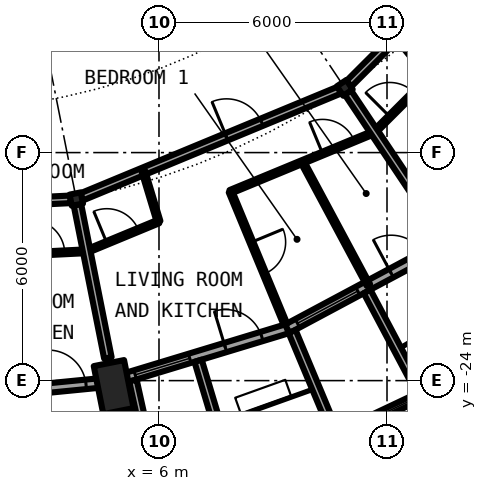
"""IFC4 building model, lengths in metres.
Left out: names, types, materials, properties, quantities, classifications, styles, units other than length and angle.
Written with IfcOpenShell. Run it as: python <this file> out.ifc"""

import sys

from ifc_helpers import new_model, si_unit, direction, frame, frame_2d, origin, origin_2d, place, context, subcontext, project, spatial, rectangle, circle, hollow_circle, i_section, extrude, element, fill, save


model = new_model("IFC4")
c1 = context("Model", 3, precision=1e-05, world=origin(), true_north=direction((0.0, 1.0)))
c2 = subcontext(c1, "Body", "Model", "MODEL_VIEW")
j1 = project(units=[si_unit("LENGTHUNIT", "METRE"), si_unit("PLANEANGLEUNIT", "RADIAN")], contexts=[c1])
p1 = place(None, origin())
s1 = spatial("IfcSite", under=j1, at=p1, CompositionType="ELEMENT")
p2 = place(p1, origin())
s2 = spatial("IfcBuilding", under=s1, at=p2, CompositionType="ELEMENT")
p3 = place(p2, frame((0.0, 0.0, 243.2)))
s3 = spatial("IfcBuildingStorey", under=s2, at=p3, CompositionType="ELEMENT", Elevation=243.2)
p4 = place(p3, frame((4.934, -24.803, 0.242), z_axis=(-0.081385783955, 0.409141348854, 0.908834259273), x_axis=(-0.980784129255, -0.195096109141, 0.0)))
e1 = element("IfcColumn", 1, at=p4, inside=s3, PredefinedType="COLUMN", context=c2, shape_type="SweptSolid", body=[
    extrude(hollow_circle(Radius=0.406, WallThickness=0.03, at=origin_2d()), origin(), (0.0, 0.0, 1.0), 3.09),
])
for number, where, z_axis, x_axis in (
    (2, (3.824, -19.223, 0.0), (0.0, 0.0, 1.0), (0.195, -0.981, 0.0)),
    (3, (10.889, -16.297, 0.0), (0.0, 0.0, 1.0), (0.556, -0.831, 0.0)),
):
    element("IfcColumn", number, at=place(p3, frame(where, z_axis=z_axis, x_axis=x_axis)), inside=s3, PredefinedType="COLUMN", context=c2, shape_type="SweptSolid", body=[
        extrude(i_section(OverallWidth=0.3, OverallDepth=0.3, WebThickness=0.011, FlangeThickness=0.019, FilletRadius=0.027, at=origin_2d()), origin(), (0.0, 0.0, 1.0), 3.05),
    ])
p5 = place(p3, frame((0.0, -24.5, 0.0), z_axis=(0.0, 0.0, 1.0), x_axis=(0.995181568754, 0.098049197923, 0.0)))
e4 = element("IfcWall", 4, at=p5, inside=s3, PredefinedType="SOLIDWALL", context=c2, shape_type="SweptSolid", body=[
    extrude(rectangle(XDim=4.803, YDim=0.25, at=frame_2d((2.402, 0.0))), origin(), (0.0, 0.0, 1.0), 2.7),
])
p6 = place(p5, frame((0.304, 0.0, 0.3)))
e5 = element("IfcOpeningElement", 5, at=p6, cuts=e4, PredefinedType="OPENING", context=c2, shape_type="SweptSolid", body=[
    extrude(rectangle(XDim=1.8, YDim=2.1, at=frame_2d((0.9, 1.05))), frame((0.0, 0.135, 0.0), z_axis=(0.0, -1.0, 0.0), x_axis=(1.0, 0.0, 0.0)), (0.0, 0.0, 1.0), 0.27),
])
p7 = place(p5, frame((3.099, 0.0, 0.0)))
e6 = element("IfcOpeningElement", 6, at=p7, cuts=e4, PredefinedType="OPENING", context=c2, shape_type="SweptSolid", body=[
    extrude(rectangle(XDim=1.0, YDim=2.2, at=frame_2d((0.5, 1.1))), frame((0.0, 0.135, 0.0), z_axis=(0.0, -1.0, 0.0), x_axis=(1.0, 0.0, 0.0)), (0.0, 0.0, 1.0), 0.27),
])
p8 = place(p3, frame((4.78, -24.029, 0.0), z_axis=(0.0, 0.0, 1.0), x_axis=(0.956947414517, 0.290261340605, 0.0)))
e7 = element("IfcWall", 7, at=p8, inside=s3, PredefinedType="SOLIDWALL", context=c2, shape_type="SweptSolid", body=[
    extrude(rectangle(XDim=4.803, YDim=0.25, at=frame_2d((2.401, 0.0))), origin(), (0.0, 0.0, 1.0), 2.7),
])
p9 = place(p8, frame((0.62, 0.0, 0.3)))
e8 = element("IfcOpeningElement", 8, at=p9, cuts=e7, PredefinedType="OPENING", context=c2, shape_type="SweptSolid", body=[
    extrude(rectangle(XDim=1.5, YDim=2.1, at=frame_2d((0.75, 1.05))), frame((0.0, 0.135, 0.0), z_axis=(0.0, -1.0, 0.0), x_axis=(1.0, 0.0, 0.0)), (0.0, 0.0, 1.0), 0.27),
])
p10 = place(p8, frame((3.099, 0.0, 0.0)))
e9 = element("IfcOpeningElement", 9, at=p10, cuts=e7, PredefinedType="OPENING", context=c2, shape_type="SweptSolid", body=[
    extrude(rectangle(XDim=1.0, YDim=2.2, at=frame_2d((0.5, 1.1))), frame((0.0, 0.135, 0.0), z_axis=(0.0, -1.0, 0.0), x_axis=(1.0, 0.0, 0.0)), (0.0, 0.0, 1.0), 0.27),
])
p11 = place(p3, frame((5.314, -23.998, -0.03), z_axis=(0.0, 0.0, 1.0), x_axis=(0.216443576636, -0.976295128603, 0.0)))
e10 = element("IfcWall", 10, at=p11, inside=s3, PredefinedType="SOLIDWALL", context=c2, shape_type="SweptSolid", body=[
    extrude(rectangle(XDim=2.92, YDim=0.2, at=frame_2d((1.46, 0.0))), origin(), (0.0, 0.0, 1.0), 2.73),
])
p12 = place(p3, frame((7.029, -23.477, -0.03), z_axis=(0.0, 0.0, 1.0), x_axis=(0.286681681931, -0.958025893828, 0.0)))
e11 = element("IfcWall", 11, at=p12, inside=s3, PredefinedType="SOLIDWALL", context=c2, shape_type="SweptSolid", body=[
    extrude(rectangle(XDim=2.992, YDim=0.2, at=frame_2d((1.496, 0.0))), origin(), (0.0, 0.0, 1.0), 2.73),
])
p13 = place(p3, frame((9.376, -22.635, 0.0), z_axis=(0.0, 0.0, 1.0), x_axis=(0.881903608701, 0.471429766731, 0.0)))
e12 = element("IfcWall", 12, at=p13, inside=s3, PredefinedType="SOLIDWALL", context=c2, shape_type="SweptSolid", body=[
    extrude(rectangle(XDim=4.802, YDim=0.25, at=frame_2d((2.401, 0.0))), origin(), (0.0, 0.0, 1.0), 2.7),
])
p14 = place(p13, frame((0.304, 0.0, 0.3)))
e13 = element("IfcOpeningElement", 13, at=p14, cuts=e12, PredefinedType="OPENING", context=c2, shape_type="SweptSolid", body=[
    extrude(rectangle(XDim=1.8, YDim=2.1, at=frame_2d((0.9, 1.05))), frame((0.0, 0.135, 0.0), z_axis=(0.0, -1.0, 0.0), x_axis=(1.0, 0.0, 0.0)), (0.0, 0.0, 1.0), 0.27),
])
p15 = place(p13, frame((3.099, 0.0, 0.0)))
e14 = element("IfcOpeningElement", 14, at=p15, cuts=e12, PredefinedType="OPENING", context=c2, shape_type="SweptSolid", body=[
    extrude(rectangle(XDim=1.0, YDim=2.2, at=frame_2d((0.5, 1.1))), frame((0.0, 0.135, 0.0), z_axis=(0.0, -1.0, 0.0), x_axis=(1.0, 0.0, 0.0)), (0.0, 0.0, 1.0), 0.27),
])
p16 = place(p3, frame((10.558, -25.501, -0.03), z_axis=(0.0, 0.0, 1.0), x_axis=(0.904004727627, 0.42752245839, 0.0)))
e15 = element("IfcWall", 15, at=p16, inside=s3, PredefinedType="SOLIDWALL", context=c2, shape_type="SweptSolid", body=[
    extrude(rectangle(XDim=2.718, YDim=0.2, at=frame_2d((1.359, 0.0))), origin(), (0.0, 0.0, 1.0), 2.73),
])
p17 = place(p16, frame((0.319, 0.0, 0.33)))
e16 = element("IfcOpeningElement", 16, at=p17, cuts=e15, PredefinedType="OPENING", context=c2, shape_type="SweptSolid", body=[
    extrude(circle(Radius=1.04, at=frame_2d((1.04, 1.04))), frame((0.0, 0.11, 0.0), z_axis=(0.0, -1.0, 0.0), x_axis=(1.0, 0.0, 0.0)), (0.0, 0.0, 1.0), 0.22),
])
p18 = place(p3, frame((9.503, -22.709, -0.03), z_axis=(0.0, 0.0, 1.0), x_axis=(0.386136412103, -0.922441689891, 0.0)))
e17 = element("IfcWall", 17, at=p18, inside=s3, PredefinedType="SOLIDWALL", context=c2, shape_type="SweptSolid", body=[
    extrude(rectangle(XDim=2.883, YDim=0.2, at=frame_2d((1.441, 0.0))), origin(), (0.0, 0.0, 1.0), 2.73),
])
p19 = place(p3, frame((11.475, -21.655, -0.03), z_axis=(0.0, 0.0, 1.0), x_axis=(0.467917715158, -0.883772036128, 0.0)))
e18 = element("IfcWall", 18, at=p19, inside=s3, PredefinedType="SOLIDWALL", context=c2, shape_type="SweptSolid", body=[
    extrude(rectangle(XDim=2.992, YDim=0.2, at=frame_2d((1.496, 0.0))), origin(), (0.0, 0.0, 1.0), 2.73),
])
p20 = place(p3, frame((2.045, -20.697, 0.0), z_axis=(0.0, 0.0, 1.0), x_axis=(0.998789106726, 0.049196750766, 0.0)))
e19 = element("IfcWall", 19, at=p20, inside=s3, PredefinedType="PARTITIONING", context=c2, shape_type="SweptSolid", body=[
    extrude(rectangle(XDim=2.054, YDim=0.1, at=frame_2d((1.027, 0.0))), origin(), (0.0, 0.0, 1.0), 2.7),
])
p21 = place(p20, frame((0.577, 0.0, 0.0)))
e20 = element("IfcOpeningElement", 20, at=p21, cuts=e19, PredefinedType="OPENING", context=c2, shape_type="SweptSolid", body=[
    extrude(rectangle(XDim=0.9, YDim=2.3, at=frame_2d((0.45, 1.15))), frame((0.0, 0.06, 0.0), z_axis=(0.0, -1.0, 0.0), x_axis=(1.0, 0.0, 0.0)), (0.0, 0.0, 1.0), 0.12),
])
p22 = place(p3, frame((4.097, -20.596, 0.0), z_axis=(0.0, 0.0, 1.0), x_axis=(0.924012474812, 0.382362323448, 0.0)))
e21 = element("IfcWall", 21, at=p22, inside=s3, PredefinedType="PARTITIONING", context=c2, shape_type="SweptSolid", body=[
    extrude(rectangle(XDim=2.048, YDim=0.1, at=frame_2d((1.024, 0.0))), origin(), (0.0, 0.0, 1.0), 2.7),
])
p23 = place(p22, frame((0.574, 0.0, 0.0)))
e22 = element("IfcOpeningElement", 22, at=p23, cuts=e21, PredefinedType="OPENING", context=c2, shape_type="SweptSolid", body=[
    extrude(rectangle(XDim=0.9, YDim=2.3, at=frame_2d((0.45, 1.15))), frame((0.0, 0.06, 0.0), z_axis=(0.0, -1.0, 0.0), x_axis=(1.0, 0.0, 0.0)), (0.0, 0.0, 1.0), 0.12),
])
p24 = place(p3, frame((7.874, -19.033, 0.0), z_axis=(0.0, 0.0, 1.0), x_axis=(0.924018283069, 0.382348286976, 0.0)))
e23 = element("IfcWall", 23, at=p24, inside=s3, PredefinedType="PARTITIONING", context=c2, shape_type="SweptSolid", body=[
    extrude(rectangle(XDim=4.101, YDim=0.1, at=frame_2d((2.05, 0.0))), origin(), (0.0, 0.0, 1.0), 2.7),
])
p25 = place(p24, frame((2.632, 0.0, 0.0)))
e24 = element("IfcOpeningElement", 24, at=p25, cuts=e23, PredefinedType="OPENING", context=c2, shape_type="SweptSolid", body=[
    extrude(rectangle(XDim=0.9, YDim=2.3, at=frame_2d((0.45, 1.15))), frame((0.0, 0.06, 0.0), z_axis=(0.0, -1.0, 0.0), x_axis=(1.0, 0.0, 0.0)), (0.0, 0.0, 1.0), 0.12),
])
p26 = place(p3, frame((11.662, -17.466, 0.0), z_axis=(0.0, 0.0, 1.0), x_axis=(0.707106781187, 0.707106781187, 0.0)))
e25 = element("IfcWall", 25, at=p26, inside=s3, PredefinedType="PARTITIONING", context=c2, shape_type="SweptSolid", body=[
    extrude(rectangle(XDim=2.048, YDim=0.1, at=frame_2d((1.024, 0.0))), origin(), (0.0, 0.0, 1.0), 2.7),
])
p27 = place(p26, frame((0.581, 0.0, 0.0)))
e26 = element("IfcOpeningElement", 26, at=p27, cuts=e25, PredefinedType="OPENING", context=c2, shape_type="SweptSolid", body=[
    extrude(rectangle(XDim=0.9, YDim=2.3, at=frame_2d((0.45, 1.15))), frame((0.0, 0.06, 0.0), z_axis=(0.0, -1.0, 0.0), x_axis=(1.0, 0.0, 0.0)), (0.0, 0.0, 1.0), 0.12),
])
p28 = place(p3, frame((-1.921, -19.506, 0.0), z_axis=(0.0, 0.0, 1.0), x_axis=(0.998783562084, 0.049309188909, 0.0)))
e27 = element("IfcWall", 27, at=p28, inside=s3, PredefinedType="PARTITIONING", context=c2, shape_type="SweptSolid", body=[
    extrude(rectangle(XDim=5.6, YDim=0.2, at=frame_2d((2.8, 0.0))), origin(), (0.0, 0.0, 1.0), 2.45),
])
p29 = place(p28, frame((1.417, 0.0, 0.0)))
e28 = element("IfcOpeningElement", 28, at=p29, cuts=e27, PredefinedType="OPENING", context=c2, shape_type="SweptSolid", body=[
    extrude(rectangle(XDim=1.0, YDim=2.3, at=frame_2d((0.5, 1.15))), frame((0.0, 0.11, 0.0), z_axis=(0.0, -1.0, 0.0), x_axis=(1.0, 0.0, 0.0)), (0.0, 0.0, 1.0), 0.22),
])
p30 = place(p3, frame((3.965, -19.165, 0.0), z_axis=(0.0, 0.0, 1.0), x_axis=(0.923857139404, 0.382737489635, 0.0)))
e29 = element("IfcWall", 29, at=p30, inside=s3, PredefinedType="PARTITIONING", context=c2, shape_type="SweptSolid", body=[
    extrude(rectangle(XDim=7.342, YDim=0.2, at=frame_2d((3.671, 0.0))), origin(), (0.0, 0.0, 1.0), 2.45),
])
p31 = place(p30, frame((4.126, 0.0, 0.0)))
e30 = element("IfcOpeningElement", 30, at=p31, cuts=e29, PredefinedType="OPENING", context=c2, shape_type="SweptSolid", body=[
    extrude(rectangle(XDim=1.0, YDim=2.3, at=frame_2d((0.5, 1.15))), frame((0.0, 0.11, 0.0), z_axis=(0.0, -1.0, 0.0), x_axis=(1.0, 0.0, 0.0)), (0.0, 0.0, 1.0), 0.22),
])
p32 = place(p3, frame((10.997, -16.189, 0.0), z_axis=(0.0, 0.0, 1.0), x_axis=(0.707106781187, 0.707106781187, 0.0)))
e31 = element("IfcWall", 31, at=p32, inside=s3, PredefinedType="PARTITIONING", context=c2, shape_type="SweptSolid", body=[
    extrude(rectangle(XDim=7.343, YDim=0.2, at=frame_2d((3.671, 0.0))), origin(), (0.0, 0.0, 1.0), 2.45),
])
p33 = place(p32, frame((4.127, 0.0, 0.0)))
e32 = element("IfcOpeningElement", 32, at=p33, cuts=e31, PredefinedType="OPENING", context=c2, shape_type="SweptSolid", body=[
    extrude(rectangle(XDim=1.0, YDim=2.3, at=frame_2d((0.5, 1.15))), frame((0.0, 0.11, 0.0), z_axis=(0.0, -1.0, 0.0), x_axis=(1.0, 0.0, 0.0)), (0.0, 0.0, 1.0), 0.22),
])
p34 = place(p3, frame((3.853, -19.37, 0.0), z_axis=(0.0, 0.0, 1.0), x_axis=(0.195144997835, -0.980774403122, 0.0)))
e33 = element("IfcWall", 33, at=p34, inside=s3, PredefinedType="PARTITIONING", context=c2, shape_type="SweptSolid", body=[
    extrude(rectangle(XDim=4.11, YDim=0.2, at=frame_2d((2.055, 0.0))), origin(), (0.0, 0.0, 1.0), 2.7),
])
p35 = place(p3, frame((5.59, -18.492, 0.0), z_axis=(0.0, 0.0, 1.0), x_axis=(0.289084131919, -0.957303695111, 0.0)))
e34 = element("IfcWall", 34, at=p35, inside=s3, PredefinedType="PARTITIONING", context=c2, shape_type="SweptSolid", body=[
    extrude(rectangle(XDim=1.38, YDim=0.1, at=frame_2d((0.69, 0.0))), origin(), (0.0, 0.0, 1.0), 2.7),
])
p36 = place(p3, frame((7.882, -19.029, 0.0), z_axis=(0.0, 0.0, 1.0), x_axis=(0.382637120452, -0.923898714174, 0.0)))
e35 = element("IfcWall", 35, at=p36, inside=s3, PredefinedType="PARTITIONING", context=c2, shape_type="SweptSolid", body=[
    extrude(rectangle(XDim=3.779, YDim=0.1, at=frame_2d((1.889, 0.0))), origin(), (0.0, 0.0, 1.0), 2.7),
])
p37 = place(p36, frame((1.439, 0.0, 0.0)))
e36 = element("IfcOpeningElement", 36, at=p37, cuts=e35, PredefinedType="OPENING", context=c2, shape_type="SweptSolid", body=[
    extrude(rectangle(XDim=0.9, YDim=2.3, at=frame_2d((0.45, 1.15))), frame((0.0, 0.06, 0.0), z_axis=(0.0, -1.0, 0.0), x_axis=(1.0, 0.0, 0.0)), (0.0, 0.0, 1.0), 0.12),
])
p38 = place(p3, frame((9.774, -18.245, 0.0), z_axis=(0.0, 0.0, 1.0), x_axis=(0.47239643711, -0.881386184488, 0.0)))
e37 = element("IfcWall", 37, at=p38, inside=s3, PredefinedType="PARTITIONING", context=c2, shape_type="SweptSolid", body=[
    extrude(rectangle(XDim=3.677, YDim=0.1, at=frame_2d((1.839, 0.0))), origin(), (0.0, 0.0, 1.0), 2.7),
])
p39 = place(p3, frame((10.972, -16.422, 0.0), z_axis=(0.0, 0.0, 1.0), x_axis=(0.555878781566, -0.831263363926, 0.0)))
e38 = element("IfcWall", 38, at=p39, inside=s3, PredefinedType="PARTITIONING", context=c2, shape_type="SweptSolid", body=[
    extrude(rectangle(XDim=4.109, YDim=0.2, at=frame_2d((2.055, 0.0))), origin(), (0.0, 0.0, 1.0), 2.7),
])
p40 = place(p3, frame((12.241, -14.945, 0.0), z_axis=(0.0, 0.0, 1.0), x_axis=(0.633719643525, -0.773562805085, 0.0)))
e39 = element("IfcWall", 39, at=p40, inside=s3, PredefinedType="PARTITIONING", context=c2, shape_type="SweptSolid", body=[
    extrude(rectangle(XDim=1.379, YDim=0.1, at=frame_2d((0.689, 0.0))), origin(), (0.0, 0.0, 1.0), 2.7),
])
p41 = place(p7, origin())
e40 = element("IfcDoor", 40, at=p41, inside=s3, OperationType="SINGLE_SWING_LEFT", PredefinedType="DOOR", context=c2, shape_type="SweptSolid", body=[
    extrude(rectangle(XDim=1.0, YDim=2.2, at=frame_2d((0.5, 1.1))), frame((0.0, 0.025, 0.0), z_axis=(0.0, -1.0, 0.0), x_axis=(1.0, 0.0, 0.0)), (0.0, 0.0, 1.0), 0.05),
])
fill(e6, e40)
p42 = place(p9, origin())
e41 = element("IfcWindow", 41, at=p42, inside=s3, PartitioningType="SINGLE_PANEL", PredefinedType="WINDOW", context=c2, shape_type="SweptSolid", body=[
    extrude(rectangle(XDim=1.5, YDim=2.1, at=frame_2d((0.75, 1.05))), frame((0.0, 0.03, 0.0), z_axis=(0.0, -1.0, 0.0), x_axis=(1.0, 0.0, 0.0)), (0.0, 0.0, 1.0), 0.06),
])
fill(e8, e41)
p43 = place(p10, origin())
e42 = element("IfcDoor", 42, at=p43, inside=s3, OperationType="SINGLE_SWING_LEFT", PredefinedType="DOOR", context=c2, shape_type="SweptSolid", body=[
    extrude(rectangle(XDim=1.0, YDim=2.2, at=frame_2d((0.5, 1.1))), frame((0.0, 0.025, 0.0), z_axis=(0.0, -1.0, 0.0), x_axis=(1.0, 0.0, 0.0)), (0.0, 0.0, 1.0), 0.05),
])
fill(e9, e42)
p44 = place(p14, origin())
e43 = element("IfcWindow", 43, at=p44, inside=s3, PartitioningType="SINGLE_PANEL", PredefinedType="WINDOW", context=c2, shape_type="SweptSolid", body=[
    extrude(rectangle(XDim=1.8, YDim=2.1, at=frame_2d((0.9, 1.05))), frame((0.0, 0.03, 0.0), z_axis=(0.0, -1.0, 0.0), x_axis=(1.0, 0.0, 0.0)), (0.0, 0.0, 1.0), 0.06),
])
fill(e13, e43)
p45 = place(p17, origin())
e44 = element("IfcWindow", 44, at=p45, inside=s3, PartitioningType="SINGLE_PANEL", PredefinedType="WINDOW", context=c2, shape_type="SweptSolid", body=[
    extrude(circle(Radius=1.04, at=frame_2d((1.04, 1.04))), frame((0.0, 0.03, 0.0), z_axis=(0.0, -1.0, 0.0), x_axis=(1.0, 0.0, 0.0)), (0.0, 0.0, 1.0), 0.06),
])
fill(e16, e44)
p46 = place(p15, origin())
e45 = element("IfcDoor", 45, at=p46, inside=s3, OperationType="SINGLE_SWING_LEFT", PredefinedType="DOOR", context=c2, shape_type="SweptSolid", body=[
    extrude(rectangle(XDim=1.0, YDim=2.2, at=frame_2d((0.5, 1.1))), frame((0.0, 0.025, 0.0), z_axis=(0.0, -1.0, 0.0), x_axis=(1.0, 0.0, 0.0)), (0.0, 0.0, 1.0), 0.05),
])
fill(e14, e45)
p47 = place(p21, origin())
e46 = element("IfcDoor", 46, at=p47, inside=s3, OperationType="SINGLE_SWING_LEFT", PredefinedType="DOOR", context=c2, shape_type="SweptSolid", body=[
    extrude(rectangle(XDim=0.9, YDim=2.3, at=frame_2d((0.45, 1.15))), frame((0.0, 0.025, 0.0), z_axis=(0.0, -1.0, 0.0), x_axis=(1.0, 0.0, 0.0)), (0.0, 0.0, 1.0), 0.05),
])
fill(e20, e46)
p48 = place(p31, origin())
e47 = element("IfcDoor", 47, at=p48, inside=s3, OperationType="SINGLE_SWING_RIGHT", PredefinedType="DOOR", context=c2, shape_type="SweptSolid", body=[
    extrude(rectangle(XDim=1.0, YDim=2.3, at=frame_2d((0.5, 1.15))), frame((0.0, 0.025, 0.0), z_axis=(0.0, -1.0, 0.0), x_axis=(1.0, 0.0, 0.0)), (0.0, 0.0, 1.0), 0.05),
])
fill(e30, e47)
p49 = place(p23, origin())
e48 = element("IfcDoor", 48, at=p49, inside=s3, OperationType="SINGLE_SWING_LEFT", PredefinedType="DOOR", context=c2, shape_type="SweptSolid", body=[
    extrude(rectangle(XDim=0.9, YDim=2.3, at=frame_2d((0.45, 1.15))), frame((0.0, 0.025, 0.0), z_axis=(0.0, -1.0, 0.0), x_axis=(1.0, 0.0, 0.0)), (0.0, 0.0, 1.0), 0.05),
])
fill(e22, e48)
p50 = place(p37, origin())
e49 = element("IfcDoor", 49, at=p50, inside=s3, OperationType="SINGLE_SWING_RIGHT", PredefinedType="DOOR", context=c2, shape_type="SweptSolid", body=[
    extrude(rectangle(XDim=0.9, YDim=2.3, at=frame_2d((0.45, 1.15))), frame((0.0, 0.025, 0.0), z_axis=(0.0, -1.0, 0.0), x_axis=(1.0, 0.0, 0.0)), (0.0, 0.0, 1.0), 0.05),
])
fill(e36, e49)
p51 = place(p25, origin())
e50 = element("IfcDoor", 50, at=p51, inside=s3, OperationType="SINGLE_SWING_RIGHT", PredefinedType="DOOR", context=c2, shape_type="SweptSolid", body=[
    extrude(rectangle(XDim=0.9, YDim=2.3, at=frame_2d((0.45, 1.15))), frame((0.0, 0.025, 0.0), z_axis=(0.0, -1.0, 0.0), x_axis=(1.0, 0.0, 0.0)), (0.0, 0.0, 1.0), 0.05),
])
fill(e24, e50)
p52 = place(p27, origin())
e51 = element("IfcDoor", 51, at=p52, inside=s3, OperationType="SINGLE_SWING_RIGHT", PredefinedType="DOOR", context=c2, shape_type="SweptSolid", body=[
    extrude(rectangle(XDim=0.9, YDim=2.3, at=frame_2d((0.45, 1.15))), frame((0.0, 0.025, 0.0), z_axis=(0.0, -1.0, 0.0), x_axis=(1.0, 0.0, 0.0)), (0.0, 0.0, 1.0), 0.05),
])
fill(e26, e51)
save(model, sys.argv[1])
